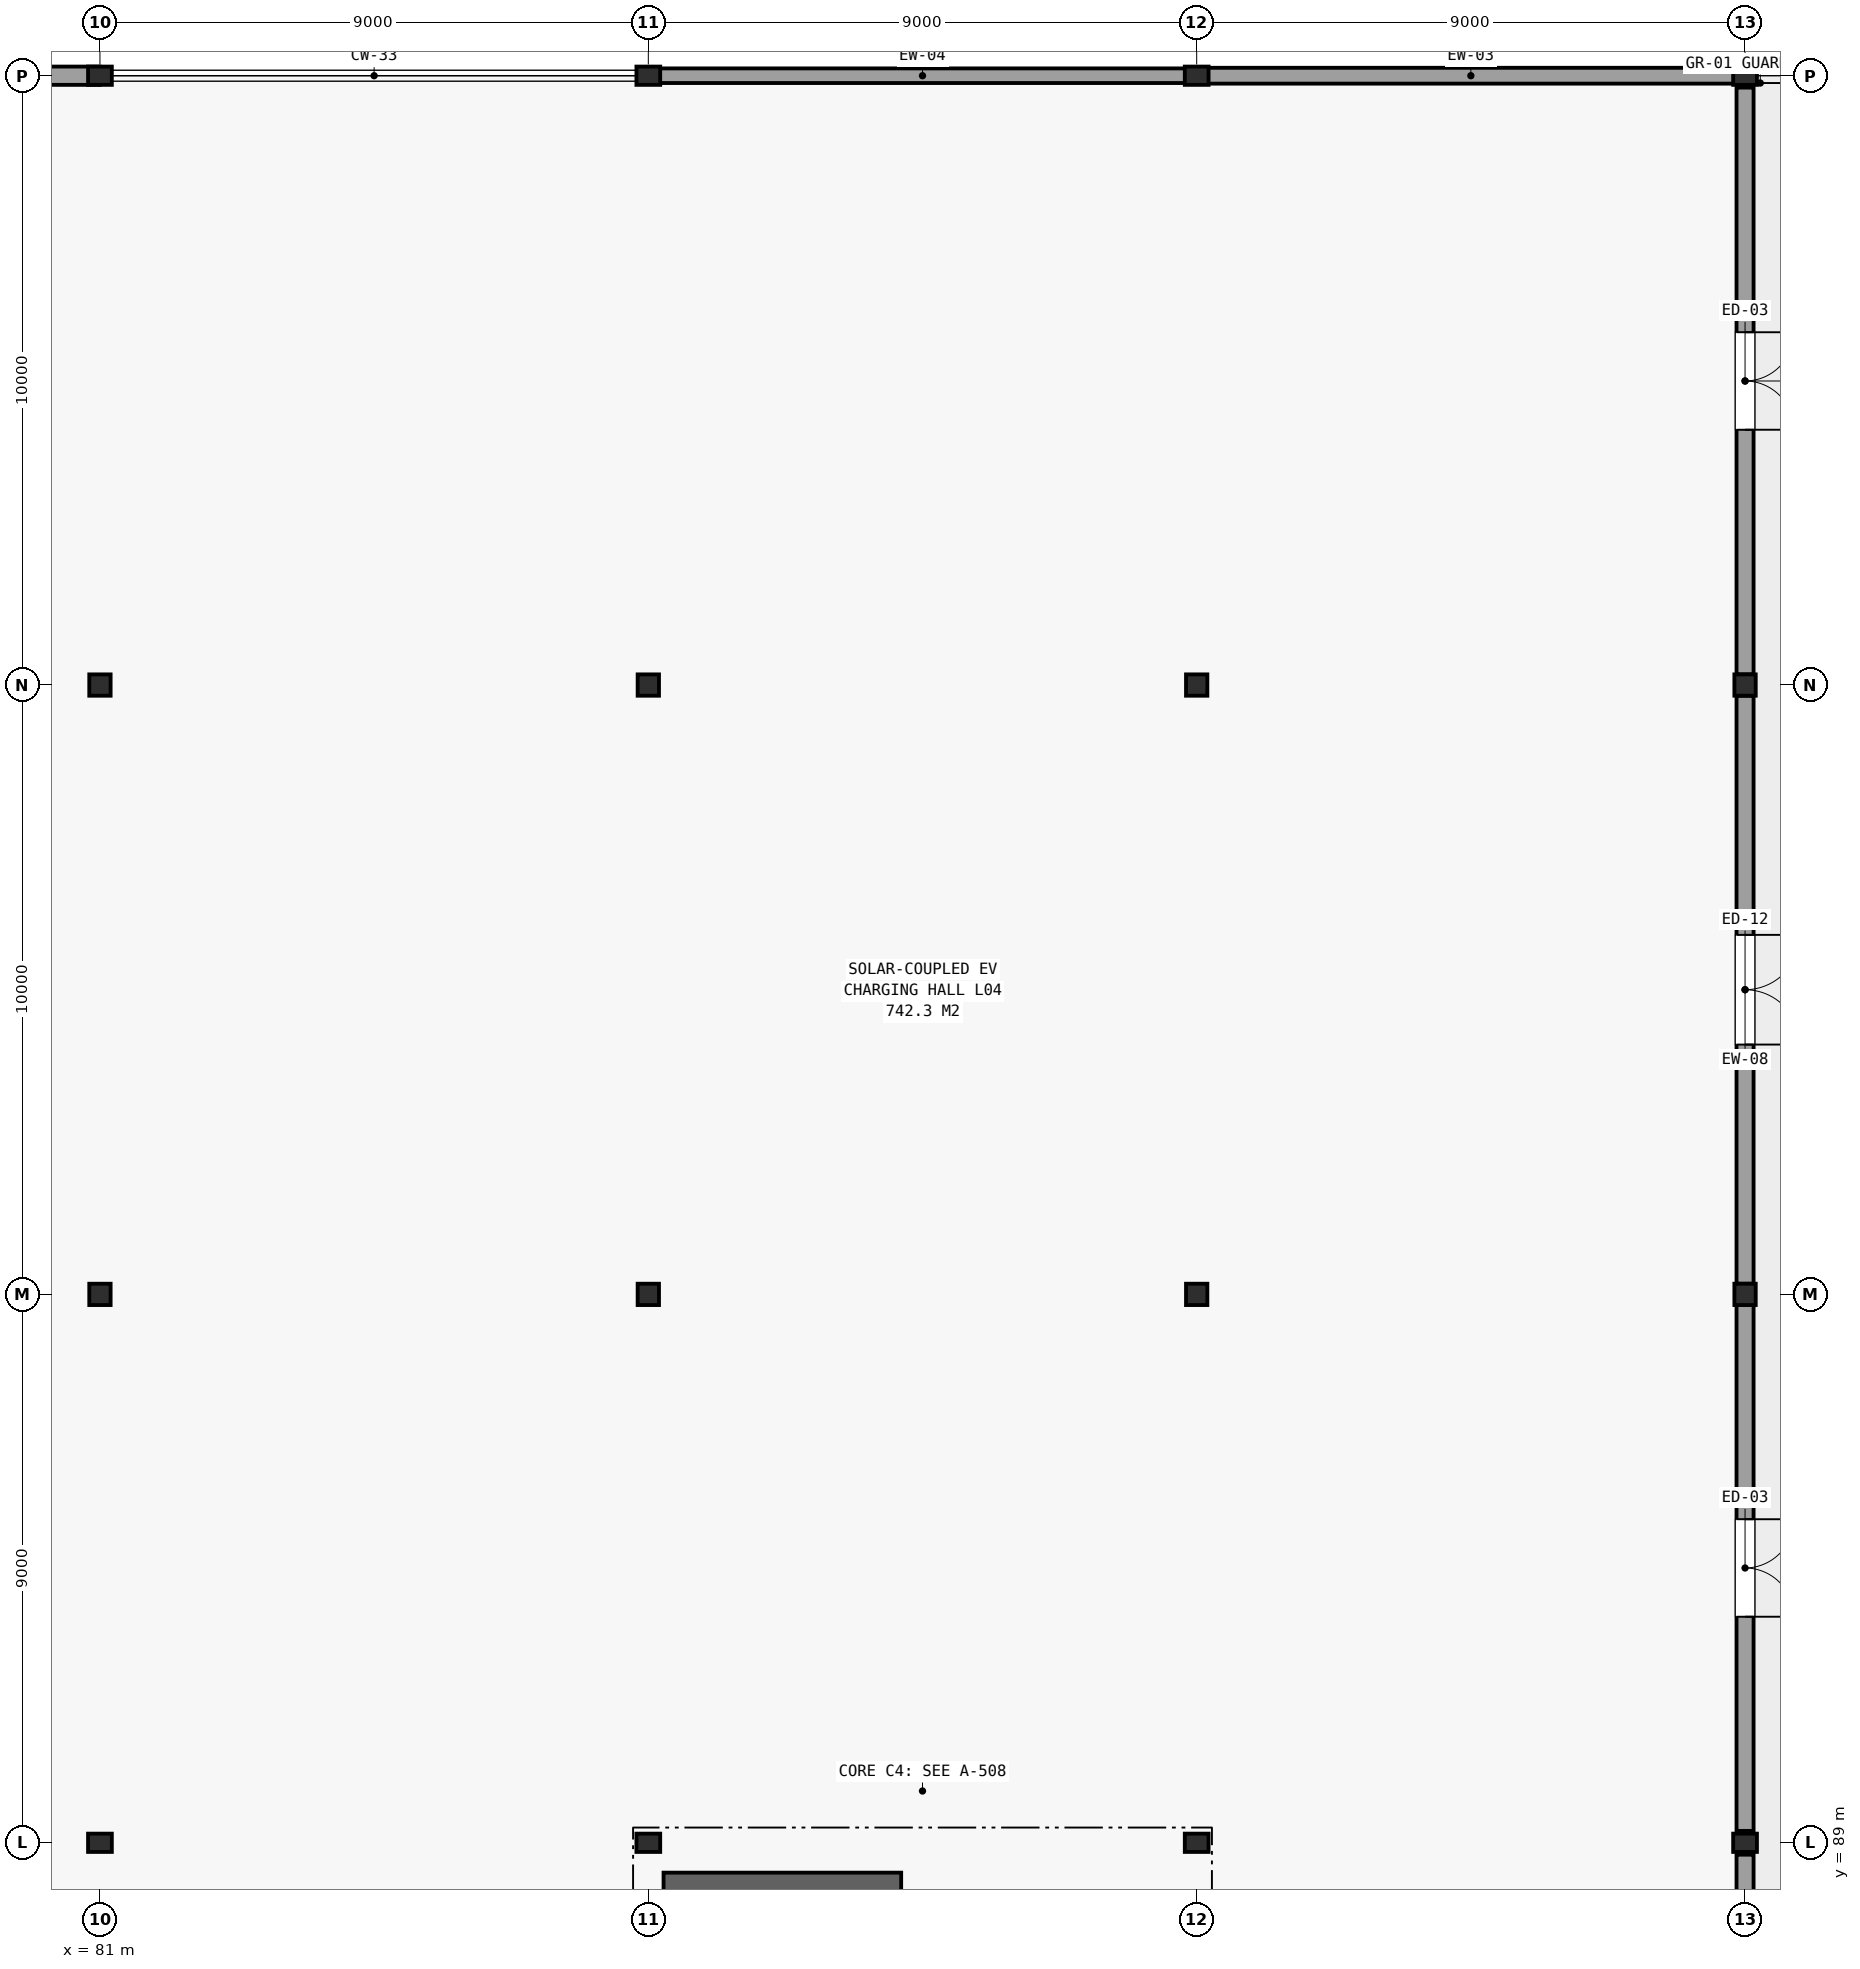
"""IFC4 building model, lengths in metres.
Left out: names, types, materials, properties, quantities, classifications, styles, units other than length and angle.
Written with IfcOpenShell. Run it as: python <this file> out.ifc"""

import sys

from ifc_helpers import new_model, si_unit, direction, frame, frame_2d, origin, origin_2d, place, context, subcontext, project, spatial, rectangle, hollow_rectangle, i_section, extrude, element, fill, save


model = new_model("IFC4")
c1 = context("Model", 3, precision=1e-05, world=origin(), true_north=direction((0.0, 1.0)))
c2 = subcontext(c1, "Body", "Model", "MODEL_VIEW")
j1 = project(units=[si_unit("LENGTHUNIT", "METRE"), si_unit("PLANEANGLEUNIT", "RADIAN")], contexts=[c1])
p1 = place(None, origin())
s1 = spatial("IfcSite", under=j1, at=p1, CompositionType="ELEMENT")
p2 = place(p1, origin())
s2 = spatial("IfcBuilding", under=s1, at=p2, CompositionType="ELEMENT")
p3 = place(p2, frame((0.0, 0.0, 17.7)))
s3 = spatial("IfcBuildingStorey", under=s2, at=p3, CompositionType="ELEMENT", Elevation=17.7)
p4 = place(p3, frame((81.0, 89.0, 0.0), z_axis=(0.0, 0.0, 1.0), x_axis=(1.0, 0.0, 0.0)))
e1 = element("IfcColumn", 1, at=p4, inside=s3, PredefinedType="COLUMN", context=c2, shape_type="SweptSolid", body=[
    extrude(i_section(OverallWidth=0.3, OverallDepth=0.39, WebThickness=0.01, FlangeThickness=0.016, FilletRadius=0.013, at=origin_2d()), origin(), (0.0, 0.0, 1.0), 4.2),
])
for number, where, z_axis, x_axis in (
    (2, (81.0, 98.0, 0.0), (0.0, 0.0, 1.0), (1.0, 0.0, 0.0)),
    (3, (81.0, 108.0, 0.0), (0.0, 0.0, 1.0), (1.0, 0.0, 0.0)),
):
    element("IfcColumn", number, at=place(p3, frame(where, z_axis=z_axis, x_axis=x_axis)), inside=s3, PredefinedType="COLUMN", context=c2, shape_type="SweptSolid", body=[
        extrude(hollow_rectangle(XDim=0.35, YDim=0.35, WallThickness=0.016, at=origin_2d()), origin(), (0.0, 0.0, 1.0), 4.2),
    ])
for number, where, z_axis, x_axis in (
    (4, (81.0, 118.0, 0.0), (0.0, 0.0, 1.0), (1.0, 0.0, 0.0)),
    (5, (90.0, 89.0, 0.0), (0.0, 0.0, 1.0), (1.0, 0.0, 0.0)),
):
    element("IfcColumn", number, at=place(p3, frame(where, z_axis=z_axis, x_axis=x_axis)), inside=s3, PredefinedType="COLUMN", context=c2, shape_type="SweptSolid", body=[
        extrude(i_section(OverallWidth=0.3, OverallDepth=0.39, WebThickness=0.01, FlangeThickness=0.016, FilletRadius=0.013, at=origin_2d()), origin(), (0.0, 0.0, 1.0), 4.2),
    ])
for number, where, z_axis, x_axis in (
    (6, (90.0, 98.0, 0.0), (0.0, 0.0, 1.0), (1.0, 0.0, 0.0)),
    (7, (90.0, 108.0, 0.0), (0.0, 0.0, 1.0), (1.0, 0.0, 0.0)),
):
    element("IfcColumn", number, at=place(p3, frame(where, z_axis=z_axis, x_axis=x_axis)), inside=s3, PredefinedType="COLUMN", context=c2, shape_type="SweptSolid", body=[
        extrude(hollow_rectangle(XDim=0.35, YDim=0.35, WallThickness=0.016, at=origin_2d()), origin(), (0.0, 0.0, 1.0), 4.2),
    ])
for number, where, z_axis, x_axis in (
    (8, (90.0, 118.0, 0.0), (0.0, 0.0, 1.0), (1.0, 0.0, 0.0)),
    (9, (99.0, 89.0, 0.0), (0.0, 0.0, 1.0), (1.0, 0.0, 0.0)),
):
    element("IfcColumn", number, at=place(p3, frame(where, z_axis=z_axis, x_axis=x_axis)), inside=s3, PredefinedType="COLUMN", context=c2, shape_type="SweptSolid", body=[
        extrude(i_section(OverallWidth=0.3, OverallDepth=0.39, WebThickness=0.01, FlangeThickness=0.016, FilletRadius=0.013, at=origin_2d()), origin(), (0.0, 0.0, 1.0), 4.2),
    ])
for number, where, z_axis, x_axis in (
    (10, (99.0, 98.0, 0.0), (0.0, 0.0, 1.0), (1.0, 0.0, 0.0)),
    (11, (99.0, 108.0, 0.0), (0.0, 0.0, 1.0), (1.0, 0.0, 0.0)),
):
    element("IfcColumn", number, at=place(p3, frame(where, z_axis=z_axis, x_axis=x_axis)), inside=s3, PredefinedType="COLUMN", context=c2, shape_type="SweptSolid", body=[
        extrude(hollow_rectangle(XDim=0.35, YDim=0.35, WallThickness=0.016, at=origin_2d()), origin(), (0.0, 0.0, 1.0), 4.2),
    ])
p5 = place(p3, frame((99.0, 118.0, 0.0), z_axis=(0.0, 0.0, 1.0), x_axis=(1.0, 0.0, 0.0)))
e12 = element("IfcColumn", 12, at=p5, inside=s3, PredefinedType="COLUMN", context=c2, shape_type="SweptSolid", body=[
    extrude(i_section(OverallWidth=0.3, OverallDepth=0.39, WebThickness=0.01, FlangeThickness=0.016, FilletRadius=0.013, at=origin_2d()), origin(), (0.0, 0.0, 1.0), 4.2),
])
p6 = place(p3, frame((108.0, 89.0, 0.0), z_axis=(0.0, 0.0, 1.0), x_axis=(1.0, 0.0, 0.0)))
e13 = element("IfcColumn", 13, at=p6, inside=s3, PredefinedType="COLUMN", context=c2, shape_type="SweptSolid", body=[
    extrude(i_section(OverallWidth=0.3, OverallDepth=0.39, WebThickness=0.01, FlangeThickness=0.016, FilletRadius=0.013, at=origin_2d()), origin(), (0.0, 0.0, 1.0), 4.14),
])
for number, where, z_axis, x_axis in (
    (14, (108.0, 98.0, 0.0), (0.0, 0.0, 1.0), (1.0, 0.0, 0.0)),
    (15, (108.0, 108.0, 0.0), (0.0, 0.0, 1.0), (1.0, 0.0, 0.0)),
):
    element("IfcColumn", number, at=place(p3, frame(where, z_axis=z_axis, x_axis=x_axis)), inside=s3, PredefinedType="COLUMN", context=c2, shape_type="SweptSolid", body=[
        extrude(hollow_rectangle(XDim=0.35, YDim=0.35, WallThickness=0.016, at=origin_2d()), origin(), (0.0, 0.0, 1.0), 4.14),
    ])
p7 = place(p3, frame((108.0, 118.0, 0.0), z_axis=(0.0, 0.0, 1.0), x_axis=(1.0, 0.0, 0.0)))
e16 = element("IfcColumn", 16, at=p7, inside=s3, PredefinedType="COLUMN", context=c2, shape_type="SweptSolid", body=[
    extrude(i_section(OverallWidth=0.3, OverallDepth=0.39, WebThickness=0.01, FlangeThickness=0.016, FilletRadius=0.013, at=origin_2d()), origin(), (0.0, 0.0, 1.0), 4.14),
])
p8 = place(p3, frame((108.0, 80.175, 0.0), z_axis=(0.0, 0.0, 1.0), x_axis=(0.0, 1.0, 0.0)))
e17 = element("IfcWall", 17, at=p8, inside=s3, PredefinedType="SOLIDWALL", context=c2, shape_type="SweptSolid", body=[
    extrude(rectangle(XDim=8.63, YDim=0.28, at=frame_2d((4.315, 0.0))), origin(), (0.0, 0.0, 1.0), 3.22),
])
p9 = place(p8, frame((5.215, 0.0, 0.0), z_axis=(0.0, 0.0, 1.0), x_axis=(-1.0, 0.0, 0.0)))
e18 = element("IfcOpeningElement", 18, at=p9, cuts=e17, PredefinedType="OPENING", context=c2, shape_type="SweptSolid", body=[
    extrude(rectangle(XDim=1.8, YDim=2.2, at=frame_2d((0.9, 1.1))), frame((0.0, 0.151, 0.0), z_axis=(0.0, -1.0, 0.0), x_axis=(1.0, 0.0, 0.0)), (0.0, 0.0, 1.0), 0.302),
])
p10 = place(p3, frame((108.0, 89.195, 0.0), z_axis=(0.0, 0.0, 1.0), x_axis=(0.0, 1.0, 0.0)))
e19 = element("IfcWall", 19, at=p10, inside=s3, PredefinedType="SOLIDWALL", context=c2, shape_type="SweptSolid", body=[
    extrude(rectangle(XDim=8.63, YDim=0.28, at=frame_2d((4.315, 0.0))), origin(), (0.0, 0.0, 1.0), 3.22),
])
p11 = place(p10, frame((5.115, 0.0, 0.0), z_axis=(0.0, 0.0, 1.0), x_axis=(-1.0, 0.0, 0.0)))
e20 = element("IfcOpeningElement", 20, at=p11, cuts=e19, PredefinedType="OPENING", context=c2, shape_type="SweptSolid", body=[
    extrude(rectangle(XDim=1.6, YDim=2.2, at=frame_2d((0.8, 1.1))), frame((0.0, 0.151, 0.0), z_axis=(0.0, -1.0, 0.0), x_axis=(1.0, 0.0, 0.0)), (0.0, 0.0, 1.0), 0.302),
])
p12 = place(p3, frame((108.0, 98.175, 0.0), z_axis=(0.0, 0.0, 1.0), x_axis=(0.0, 1.0, 0.0)))
e21 = element("IfcWall", 21, at=p12, inside=s3, PredefinedType="SOLIDWALL", context=c2, shape_type="SweptSolid", body=[
    extrude(rectangle(XDim=9.65, YDim=0.28, at=frame_2d((4.825, 0.0))), origin(), (0.0, 0.0, 1.0), 3.22),
])
p13 = place(p12, frame((5.725, 0.0, 0.0), z_axis=(0.0, 0.0, 1.0), x_axis=(-1.0, 0.0, 0.0)))
e22 = element("IfcOpeningElement", 22, at=p13, cuts=e21, PredefinedType="OPENING", context=c2, shape_type="SweptSolid", body=[
    extrude(rectangle(XDim=1.8, YDim=2.2, at=frame_2d((0.9, 1.1))), frame((0.0, 0.151, 0.0), z_axis=(0.0, -1.0, 0.0), x_axis=(1.0, 0.0, 0.0)), (0.0, 0.0, 1.0), 0.302),
])
p14 = place(p3, frame((108.0, 108.175, 0.0), z_axis=(0.0, 0.0, 1.0), x_axis=(0.0, 1.0, 0.0)))
e23 = element("IfcWall", 23, at=p14, inside=s3, PredefinedType="SOLIDWALL", context=c2, shape_type="SweptSolid", body=[
    extrude(rectangle(XDim=9.63, YDim=0.28, at=frame_2d((4.815, 0.0))), origin(), (0.0, 0.0, 1.0), 3.22),
])
p15 = place(p14, frame((5.615, 0.0, 0.0), z_axis=(0.0, 0.0, 1.0), x_axis=(-1.0, 0.0, 0.0)))
e24 = element("IfcOpeningElement", 24, at=p15, cuts=e23, PredefinedType="OPENING", context=c2, shape_type="SweptSolid", body=[
    extrude(rectangle(XDim=1.6, YDim=2.2, at=frame_2d((0.8, 1.1))), frame((0.0, 0.151, 0.0), z_axis=(0.0, -1.0, 0.0), x_axis=(1.0, 0.0, 0.0)), (0.0, 0.0, 1.0), 0.302),
])
p16 = place(p3, frame((107.996, 118.0, 0.0), z_axis=(0.0, 0.0, 1.0), x_axis=(-1.0, 0.0, 0.0)))
e25 = element("IfcWall", 25, at=p16, inside=s3, PredefinedType="SOLIDWALL", context=c2, shape_type="SweptSolid", body=[
    extrude(rectangle(XDim=8.991, YDim=0.26, at=frame_2d((4.496, 0.0))), origin(), (0.0, 0.0, 1.0), 3.22),
])
p17 = place(p3, frame((98.996, 118.0, 0.0), z_axis=(0.0, 0.0, 1.0), x_axis=(-1.0, 0.0, 0.0)))
e26 = element("IfcWall", 26, at=p17, inside=s3, PredefinedType="SOLIDWALL", context=c2, shape_type="SweptSolid", body=[
    extrude(rectangle(XDim=8.991, YDim=0.24, at=frame_2d((4.496, 0.0))), origin(), (0.0, 0.0, 1.0), 3.25),
])
p18 = place(p3, frame((80.996, 118.0, 0.0), z_axis=(0.0, 0.0, 1.0), x_axis=(-1.0, 0.0, 0.0)))
e27 = element("IfcWall", 27, at=p18, inside=s3, PredefinedType="SOLIDWALL", context=c2, shape_type="SweptSolid", body=[
    extrude(rectangle(XDim=8.821, YDim=0.3, at=frame_2d((4.41, 0.0))), origin(), (0.0, 0.0, 1.0), 3.25),
])
p19 = place(p3, frame((90.25, 88.355, 0.0), z_axis=(0.0, 0.0, 1.0), x_axis=(1.0, 0.0, 0.0)))
e28 = element("IfcWall", 28, at=p19, inside=s3, PredefinedType="SHEAR", context=c2, shape_type="SweptSolid", body=[
    extrude(rectangle(XDim=3.9, YDim=0.31, at=frame_2d((1.95, 0.0))), origin(), (0.0, 0.0, 1.0), 3.92),
])
p20 = place(p11, origin())
e29 = element("IfcDoor", 29, at=p20, inside=s3, OperationType="SINGLE_SWING_LEFT", PredefinedType="DOOR", context=c2, shape_type="SweptSolid", body=[
    extrude(rectangle(XDim=1.6, YDim=2.2, at=frame_2d((0.8, 1.1))), frame((0.0, 0.025, 0.0), z_axis=(0.0, -1.0, 0.0), x_axis=(1.0, 0.0, 0.0)), (0.0, 0.0, 1.0), 0.05),
])
fill(e20, e29)
p21 = place(p13, origin())
e30 = element("IfcDoor", 30, at=p21, inside=s3, OperationType="SINGLE_SWING_LEFT", PredefinedType="DOOR", context=c2, shape_type="SweptSolid", body=[
    extrude(rectangle(XDim=1.8, YDim=2.2, at=frame_2d((0.9, 1.1))), frame((0.0, 0.025, 0.0), z_axis=(0.0, -1.0, 0.0), x_axis=(1.0, 0.0, 0.0)), (0.0, 0.0, 1.0), 0.05),
])
fill(e22, e30)
p22 = place(p15, origin())
e31 = element("IfcDoor", 31, at=p22, inside=s3, OperationType="SINGLE_SWING_LEFT", PredefinedType="DOOR", context=c2, shape_type="SweptSolid", body=[
    extrude(rectangle(XDim=1.6, YDim=2.2, at=frame_2d((0.8, 1.1))), frame((0.0, 0.025, 0.0), z_axis=(0.0, -1.0, 0.0), x_axis=(1.0, 0.0, 0.0)), (0.0, 0.0, 1.0), 0.05),
])
fill(e24, e31)
save(model, sys.argv[1])
